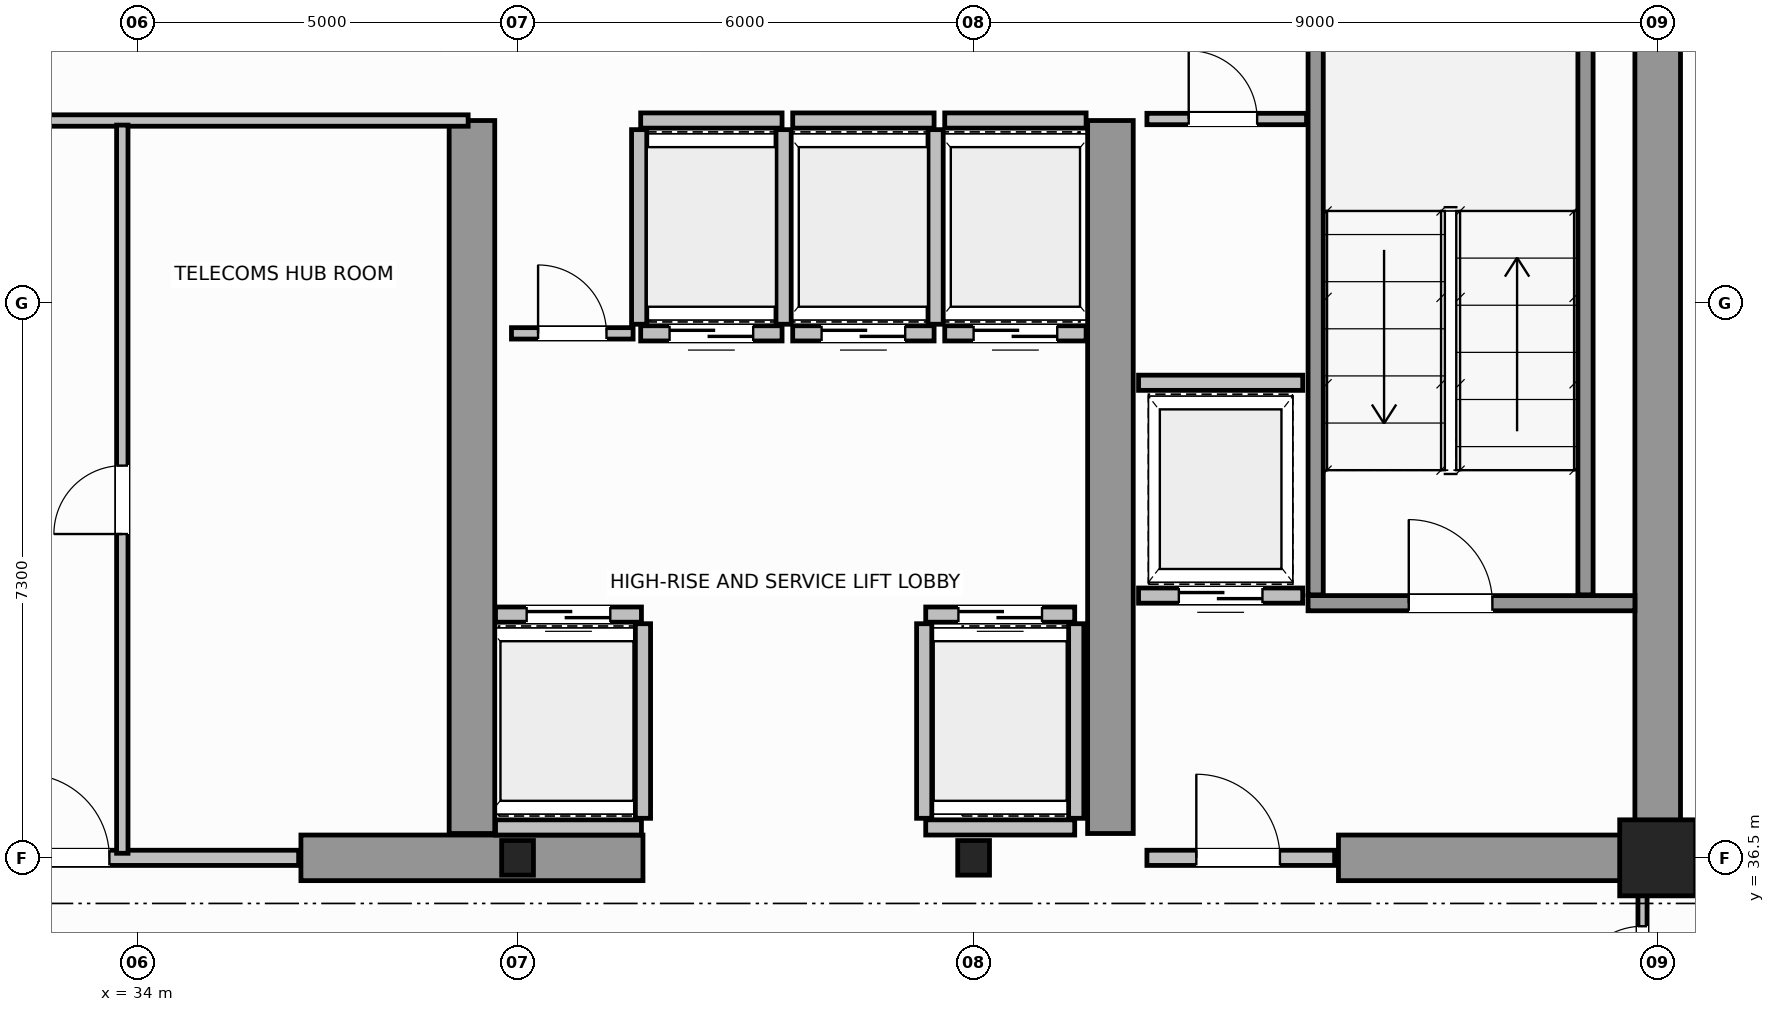
"""IFC4 building model, lengths in metres.
Left out: names, types, materials, properties, quantities, classifications, styles, units other than length and angle.
Written with IfcOpenShell. Run it as: python <this file> out.ifc"""

import sys

from ifc_helpers import new_model, si_unit, direction, frame, frame_2d, origin, origin_2d, place, context, subcontext, project, spatial, rectangle, i_section, extrude, source, transform, mapped, element, fill, save


model = new_model("IFC4")
c1 = context("Model", 3, precision=1e-05, world=origin(), true_north=direction((0.0, 1.0)))
c2 = subcontext(c1, "Body", "Model", "MODEL_VIEW")
j1 = project(units=[si_unit("LENGTHUNIT", "METRE"), si_unit("PLANEANGLEUNIT", "RADIAN")], contexts=[c1])
p1 = place(None, origin())
s1 = spatial("IfcSite", under=j1, at=p1, CompositionType="ELEMENT")
p2 = place(p1, origin())
s2 = spatial("IfcBuilding", under=s1, at=p2, CompositionType="ELEMENT")
p3 = place(p2, frame((0.0, 0.0, 227.0)))
s3 = spatial("IfcBuildingStorey", under=s2, at=p3, CompositionType="ELEMENT", Elevation=227.0)
m1 = source(origin(), c2, "Body", "SweptSolid", [
    extrude(i_section(OverallWidth=0.418, OverallDepth=0.455, WebThickness=0.042, FlangeThickness=0.058, FilletRadius=0.015, at=origin_2d()), origin(), (0.0, 0.0, 1.0), 3.8),
])
for number, where, z_axis, x_axis in (
    (1, (39.0, 36.5, 0.0), (0.0, 0.0, 1.0), (1.0, 0.0, 0.0)),
    (2, (45.0, 36.5, 0.0), (0.0, 0.0, 1.0), (1.0, 0.0, 0.0)),
):
    element("IfcColumn", number, at=place(p3, frame(where, z_axis=z_axis, x_axis=x_axis)), inside=s3, PredefinedType="COLUMN", context=c2, shape_type="MappedRepresentation", body=[
        mapped(m1, transform((0.0, 0.0, 0.0), scale=1.0)),
    ])
m2 = source(origin(), c2, "Body", "SweptSolid", [
    extrude(rectangle(XDim=1.0, YDim=1.0, at=origin_2d()), origin(), (0.0, 0.0, 1.0), 3.8),
])
p4 = place(p3, frame((54.0, 36.5, 0.0), z_axis=(0.0, 0.0, 1.0), x_axis=(1.0, 0.0, 0.0)))
e3 = element("IfcColumn", 3, at=p4, inside=s3, PredefinedType="COLUMN", context=c2, shape_type="MappedRepresentation", body=[
    mapped(m2, transform((0.0, 0.0, 0.0), scale=1.0)),
])
p5 = place(p3, frame((54.0, 36.5, 0.0), z_axis=(0.0, 0.0, 1.0), x_axis=(0.0, 1.0, 0.0)))
e4 = element("IfcWall", 4, at=p5, inside=s3, PredefinedType="SHEAR", context=c2, shape_type="SweptSolid", body=[
    extrude(rectangle(XDim=14.5, YDim=0.6, at=frame_2d((7.25, 0.0))), origin(), (0.0, 0.0, 1.0), 3.8),
])
p6 = place(p3, frame((36.15, 36.5, 0.0), z_axis=(0.0, 0.0, 1.0), x_axis=(1.0, 0.0, 0.0)))
e5 = element("IfcWall", 5, at=p6, inside=s3, PredefinedType="SHEAR", context=c2, shape_type="SweptSolid", body=[
    extrude(rectangle(XDim=4.5, YDim=0.6, at=frame_2d((2.25, 0.0))), origin(), (0.0, 0.0, 1.0), 3.8),
])
p7 = place(p3, frame((49.8, 36.5, 0.0), z_axis=(0.0, 0.0, 1.0), x_axis=(1.0, 0.0, 0.0)))
e6 = element("IfcWall", 6, at=p7, inside=s3, PredefinedType="SHEAR", context=c2, shape_type="SweptSolid", body=[
    extrude(rectangle(XDim=3.88, YDim=0.6, at=frame_2d((1.94, 0.0))), origin(), (0.0, 0.0, 1.0), 2.58),
])
for number, where, z_axis, x_axis in (
    (7, (38.4, 36.82, 0.0), (0.0, 0.0, 1.0), (0.0, 1.0, 0.0)),
    (8, (46.8, 36.82, 0.0), (0.0, 0.0, 1.0), (0.0, 1.0, 0.0)),
):
    element("IfcWall", number, at=place(p3, frame(where, z_axis=z_axis, x_axis=x_axis)), inside=s3, PredefinedType="SHEAR", context=c2, shape_type="SweptSolid", body=[
        extrude(rectangle(XDim=9.38, YDim=0.6, at=frame_2d((4.69, 0.0))), origin(), (0.0, 0.0, 1.0), 3.8),
    ])
p8 = place(p3, frame((49.4, 39.85, 0.0), z_axis=(0.0, 0.0, 1.0), x_axis=(1.0, 0.0, 0.0)))
e9 = element("IfcWall", 9, at=p8, inside=s3, PredefinedType="SOLIDWALL", context=c2, shape_type="SweptSolid", body=[
    extrude(rectangle(XDim=4.3, YDim=0.2, at=frame_2d((2.15, 0.0))), origin(), (0.0, 0.0, 1.0), 3.8),
])
p9 = place(p8, frame((1.325, 0.0, 0.0)))
e10 = element("IfcOpeningElement", 10, at=p9, cuts=e9, PredefinedType="OPENING", context=c2, shape_type="SweptSolid", body=[
    extrude(rectangle(XDim=1.1, YDim=2.15, at=frame_2d((0.55, 1.075))), frame((0.0, 0.11, 0.0), z_axis=(0.0, -1.0, 0.0), x_axis=(1.0, 0.0, 0.0)), (0.0, 0.0, 1.0), 0.22),
])
for number, where, z_axis, x_axis in (
    (11, (49.5, 39.96, 0.0), (0.0, 0.0, 1.0), (0.0, 1.0, 0.0)),
    (12, (53.05, 39.96, 0.0), (0.0, 0.0, 1.0), (0.0, 1.0, 0.0)),
):
    element("IfcWall", number, at=place(p3, frame(where, z_axis=z_axis, x_axis=x_axis)), inside=s3, PredefinedType="SOLIDWALL", context=c2, shape_type="SweptSolid", body=[
        extrude(rectangle(XDim=9.93, YDim=0.2, at=frame_2d((4.965, 0.0))), origin(), (0.0, 0.0, 1.0), 3.8),
    ])
p10 = place(p3, frame((47.28, 36.5, 0.0), z_axis=(0.0, 0.0, 1.0), x_axis=(1.0, 0.0, 0.0)))
e13 = element("IfcWall", 13, at=p10, inside=s3, PredefinedType="SOLIDWALL", context=c2, shape_type="SweptSolid", body=[
    extrude(rectangle(XDim=2.47, YDim=0.2, at=frame_2d((1.235, 0.0))), origin(), (0.0, 0.0, 1.0), 2.57),
])
p11 = place(p10, frame((0.65, 0.0, 0.0)))
e14 = element("IfcOpeningElement", 14, at=p11, cuts=e13, PredefinedType="OPENING", context=c2, shape_type="SweptSolid", body=[
    extrude(rectangle(XDim=1.1, YDim=2.15, at=frame_2d((0.55, 1.075))), frame((0.0, 0.11, 0.0), z_axis=(0.0, -1.0, 0.0), x_axis=(1.0, 0.0, 0.0)), (0.0, 0.0, 1.0), 0.22),
])
p12 = place(p3, frame((38.71, 39.7, 0.0), z_axis=(0.0, 0.0, 1.0), x_axis=(1.0, 0.0, 0.0)))
e15 = element("IfcWall", 15, at=p12, inside=s3, PredefinedType="SOLIDWALL", context=c2, shape_type="SweptSolid", body=[
    extrude(rectangle(XDim=1.92, YDim=0.2, at=frame_2d((0.96, 0.0))), origin(), (0.0, 0.0, 1.0), 3.58),
])
p13 = place(p12, frame((0.41, 0.0, 0.0)))
e16 = element("IfcOpeningElement", 16, at=p13, cuts=e15, PredefinedType="OPENING", context=c2, shape_type="SweptSolid", body=[
    extrude(rectangle(XDim=1.1, YDim=2.15, at=frame_2d((0.55, 1.075))), frame((0.0, 0.11, 0.0), z_axis=(0.0, -1.0, 0.0), x_axis=(1.0, 0.0, 0.0)), (0.0, 0.0, 1.0), 0.22),
])
p14 = place(p3, frame((38.71, 36.9, 0.0), z_axis=(0.0, 0.0, 1.0), x_axis=(1.0, 0.0, 0.0)))
e17 = element("IfcWall", 17, at=p14, inside=s3, PredefinedType="SOLIDWALL", context=c2, shape_type="SweptSolid", body=[
    extrude(rectangle(XDim=1.92, YDim=0.2, at=frame_2d((0.96, 0.0))), origin(), (0.0, 0.0, 1.0), 3.58),
])
p15 = place(p3, frame((40.65, 37.02, 0.0), z_axis=(0.0, 0.0, 1.0), x_axis=(0.0, 1.0, 0.0)))
e18 = element("IfcWall", 18, at=p15, inside=s3, PredefinedType="SOLIDWALL", context=c2, shape_type="SweptSolid", body=[
    extrude(rectangle(XDim=2.56, YDim=0.2, at=frame_2d((1.28, 0.0))), origin(), (0.0, 0.0, 1.0), 3.58),
])
p16 = place(p3, frame((44.37, 39.7, 0.0), z_axis=(0.0, 0.0, 1.0), x_axis=(1.0, 0.0, 0.0)))
e19 = element("IfcWall", 19, at=p16, inside=s3, PredefinedType="SOLIDWALL", context=c2, shape_type="SweptSolid", body=[
    extrude(rectangle(XDim=1.96, YDim=0.2, at=frame_2d((0.98, 0.0))), origin(), (0.0, 0.0, 1.0), 3.58),
])
p17 = place(p16, frame((0.43, 0.0, 0.0)))
e20 = element("IfcOpeningElement", 20, at=p17, cuts=e19, PredefinedType="OPENING", context=c2, shape_type="SweptSolid", body=[
    extrude(rectangle(XDim=1.1, YDim=2.15, at=frame_2d((0.55, 1.075))), frame((0.0, 0.11, 0.0), z_axis=(0.0, -1.0, 0.0), x_axis=(1.0, 0.0, 0.0)), (0.0, 0.0, 1.0), 0.22),
])
p18 = place(p3, frame((44.37, 36.9, 0.0), z_axis=(0.0, 0.0, 1.0), x_axis=(1.0, 0.0, 0.0)))
e21 = element("IfcWall", 21, at=p18, inside=s3, PredefinedType="SOLIDWALL", context=c2, shape_type="SweptSolid", body=[
    extrude(rectangle(XDim=1.96, YDim=0.2, at=frame_2d((0.98, 0.0))), origin(), (0.0, 0.0, 1.0), 2.57),
])
for number, where, z_axis, x_axis in (
    (22, (44.35, 37.02, 0.0), (0.0, 0.0, 1.0), (0.0, 1.0, 0.0)),
    (23, (46.35, 37.02, 0.0), (0.0, 0.0, 1.0), (0.0, 1.0, 0.0)),
):
    element("IfcWall", number, at=place(p3, frame(where, z_axis=z_axis, x_axis=x_axis)), inside=s3, PredefinedType="SOLIDWALL", context=c2, shape_type="SweptSolid", body=[
        extrude(rectangle(XDim=2.56, YDim=0.2, at=frame_2d((1.28, 0.0))), origin(), (0.0, 0.0, 1.0), 3.58),
    ])
p19 = place(p3, frame((40.62, 43.4, 0.0), z_axis=(0.0, 0.0, 1.0), x_axis=(1.0, 0.0, 0.0)))
e24 = element("IfcWall", 24, at=p19, inside=s3, PredefinedType="SOLIDWALL", context=c2, shape_type="SweptSolid", body=[
    extrude(rectangle(XDim=1.86, YDim=0.2, at=frame_2d((0.93, 0.0))), origin(), (0.0, 0.0, 1.0), 3.58),
])
p20 = place(p19, frame((0.38, 0.0, 0.0)))
e25 = element("IfcOpeningElement", 25, at=p20, cuts=e24, PredefinedType="OPENING", context=c2, shape_type="SweptSolid", body=[
    extrude(rectangle(XDim=1.1, YDim=2.15, at=frame_2d((0.55, 1.075))), frame((0.0, 0.11, 0.0), z_axis=(0.0, -1.0, 0.0), x_axis=(1.0, 0.0, 0.0)), (0.0, 0.0, 1.0), 0.22),
])
p21 = place(p3, frame((40.62, 46.2, 0.0), z_axis=(0.0, 0.0, 1.0), x_axis=(1.0, 0.0, 0.0)))
e26 = element("IfcWall", 26, at=p21, inside=s3, PredefinedType="SOLIDWALL", context=c2, shape_type="SweptSolid", body=[
    extrude(rectangle(XDim=1.86, YDim=0.2, at=frame_2d((0.93, 0.0))), origin(), (0.0, 0.0, 1.0), 3.58),
])
for number, where, z_axis, x_axis in (
    (27, (40.6, 43.52, 0.0), (0.0, 0.0, 1.0), (0.0, 1.0, 0.0)),
    (28, (42.5, 43.52, 0.0), (0.0, 0.0, 1.0), (0.0, 1.0, 0.0)),
):
    element("IfcWall", number, at=place(p3, frame(where, z_axis=z_axis, x_axis=x_axis)), inside=s3, PredefinedType="SOLIDWALL", context=c2, shape_type="SweptSolid", body=[
        extrude(rectangle(XDim=2.56, YDim=0.2, at=frame_2d((1.28, 0.0))), origin(), (0.0, 0.0, 1.0), 3.58),
    ])
p22 = place(p3, frame((42.62, 43.4, 0.0), z_axis=(0.0, 0.0, 1.0), x_axis=(1.0, 0.0, 0.0)))
e29 = element("IfcWall", 29, at=p22, inside=s3, PredefinedType="SOLIDWALL", context=c2, shape_type="SweptSolid", body=[
    extrude(rectangle(XDim=1.86, YDim=0.2, at=frame_2d((0.93, 0.0))), origin(), (0.0, 0.0, 1.0), 3.58),
])
p23 = place(p22, frame((0.38, 0.0, 0.0)))
e30 = element("IfcOpeningElement", 30, at=p23, cuts=e29, PredefinedType="OPENING", context=c2, shape_type="SweptSolid", body=[
    extrude(rectangle(XDim=1.1, YDim=2.15, at=frame_2d((0.55, 1.075))), frame((0.0, 0.11, 0.0), z_axis=(0.0, -1.0, 0.0), x_axis=(1.0, 0.0, 0.0)), (0.0, 0.0, 1.0), 0.22),
])
p24 = place(p3, frame((42.62, 46.2, 0.0), z_axis=(0.0, 0.0, 1.0), x_axis=(1.0, 0.0, 0.0)))
e31 = element("IfcWall", 31, at=p24, inside=s3, PredefinedType="SOLIDWALL", context=c2, shape_type="SweptSolid", body=[
    extrude(rectangle(XDim=1.86, YDim=0.2, at=frame_2d((0.93, 0.0))), origin(), (0.0, 0.0, 1.0), 3.58),
])
p25 = place(p3, frame((44.5, 43.52, 0.0), z_axis=(0.0, 0.0, 1.0), x_axis=(0.0, 1.0, 0.0)))
e32 = element("IfcWall", 32, at=p25, inside=s3, PredefinedType="SOLIDWALL", context=c2, shape_type="SweptSolid", body=[
    extrude(rectangle(XDim=2.56, YDim=0.2, at=frame_2d((1.28, 0.0))), origin(), (0.0, 0.0, 1.0), 3.58),
])
p26 = place(p3, frame((44.62, 43.4, 0.0), z_axis=(0.0, 0.0, 1.0), x_axis=(1.0, 0.0, 0.0)))
e33 = element("IfcWall", 33, at=p26, inside=s3, PredefinedType="SOLIDWALL", context=c2, shape_type="SweptSolid", body=[
    extrude(rectangle(XDim=1.86, YDim=0.2, at=frame_2d((0.93, 0.0))), origin(), (0.0, 0.0, 1.0), 3.58),
])
p27 = place(p26, frame((0.38, 0.0, 0.0)))
e34 = element("IfcOpeningElement", 34, at=p27, cuts=e33, PredefinedType="OPENING", context=c2, shape_type="SweptSolid", body=[
    extrude(rectangle(XDim=1.1, YDim=2.15, at=frame_2d((0.55, 1.075))), frame((0.0, 0.11, 0.0), z_axis=(0.0, -1.0, 0.0), x_axis=(1.0, 0.0, 0.0)), (0.0, 0.0, 1.0), 0.22),
])
p28 = place(p3, frame((44.62, 46.2, 0.0), z_axis=(0.0, 0.0, 1.0), x_axis=(1.0, 0.0, 0.0)))
e35 = element("IfcWall", 35, at=p28, inside=s3, PredefinedType="SOLIDWALL", context=c2, shape_type="SweptSolid", body=[
    extrude(rectangle(XDim=1.86, YDim=0.2, at=frame_2d((0.93, 0.0))), origin(), (0.0, 0.0, 1.0), 3.58),
])
p29 = place(p3, frame((47.17, 39.95, 0.0), z_axis=(0.0, 0.0, 1.0), x_axis=(1.0, 0.0, 0.0)))
e36 = element("IfcWall", 36, at=p29, inside=s3, PredefinedType="SOLIDWALL", context=c2, shape_type="SweptSolid", body=[
    extrude(rectangle(XDim=2.16, YDim=0.2, at=frame_2d((1.08, 0.0))), origin(), (0.0, 0.0, 1.0), 3.58),
])
p30 = place(p29, frame((0.53, 0.0, 0.0)))
e37 = element("IfcOpeningElement", 37, at=p30, cuts=e36, PredefinedType="OPENING", context=c2, shape_type="SweptSolid", body=[
    extrude(rectangle(XDim=1.1, YDim=2.15, at=frame_2d((0.55, 1.075))), frame((0.0, 0.11, 0.0), z_axis=(0.0, -1.0, 0.0), x_axis=(1.0, 0.0, 0.0)), (0.0, 0.0, 1.0), 0.22),
])
p31 = place(p3, frame((47.17, 42.75, 0.0), z_axis=(0.0, 0.0, 1.0), x_axis=(1.0, 0.0, 0.0)))
e38 = element("IfcWall", 38, at=p31, inside=s3, PredefinedType="SOLIDWALL", context=c2, shape_type="SweptSolid", body=[
    extrude(rectangle(XDim=2.16, YDim=0.2, at=frame_2d((1.08, 0.0))), origin(), (0.0, 0.0, 1.0), 3.58),
])
p32 = place(p3, frame((32.08, 36.5, 0.0), z_axis=(0.0, 0.0, 1.0), x_axis=(1.0, 0.0, 0.0)))
e39 = element("IfcWall", 39, at=p32, inside=s3, PredefinedType="SOLIDWALL", context=c2, shape_type="SweptSolid", body=[
    extrude(rectangle(XDim=4.04, YDim=0.2, at=frame_2d((2.02, 0.0))), origin(), (0.0, 0.0, 1.0), 3.02),
])
p33 = place(p32, frame((0.45, 0.0, 0.0)))
e40 = element("IfcOpeningElement", 40, at=p33, cuts=e39, PredefinedType="OPENING", context=c2, shape_type="SweptSolid", body=[
    extrude(rectangle(XDim=1.1, YDim=2.15, at=frame_2d((0.55, 1.075))), frame((0.0, 0.11, 0.0), z_axis=(0.0, -1.0, 0.0), x_axis=(1.0, 0.0, 0.0)), (0.0, 0.0, 1.0), 0.22),
])
p34 = place(p3, frame((29.85, 46.2, 0.0), z_axis=(0.0, 0.0, 1.0), x_axis=(1.0, 0.0, 0.0)))
e41 = element("IfcWall", 41, at=p34, inside=s3, PredefinedType="PARTITIONING", context=c2, shape_type="SweptSolid", body=[
    extrude(rectangle(XDim=8.5, YDim=0.15, at=frame_2d((4.25, 0.0))), origin(), (0.0, 0.0, 1.0), 3.58),
])
p35 = place(p3, frame((33.8, 36.56, 0.0), z_axis=(0.0, 0.0, 1.0), x_axis=(0.0, 1.0, 0.0)))
e42 = element("IfcWall", 42, at=p35, inside=s3, PredefinedType="PARTITIONING", context=c2, shape_type="SweptSolid", body=[
    extrude(rectangle(XDim=9.58, YDim=0.15, at=frame_2d((4.79, 0.0))), origin(), (0.0, 0.0, 1.0), 3.58),
])
p36 = place(p35, frame((4.2, 0.0, 0.0)))
e43 = element("IfcOpeningElement", 43, at=p36, cuts=e42, PredefinedType="OPENING", context=c2, shape_type="SweptSolid", body=[
    extrude(rectangle(XDim=0.9, YDim=2.1, at=frame_2d((0.45, 1.05))), frame((0.0, 0.085, 0.0), z_axis=(0.0, -1.0, 0.0), x_axis=(1.0, 0.0, 0.0)), (0.0, 0.0, 1.0), 0.17),
])
p37 = place(p3, frame((47.28, 46.22, 0.0), z_axis=(0.0, 0.0, 1.0), x_axis=(1.0, 0.0, 0.0)))
e44 = element("IfcWall", 44, at=p37, inside=s3, PredefinedType="PARTITIONING", context=c2, shape_type="SweptSolid", body=[
    extrude(rectangle(XDim=2.1, YDim=0.15, at=frame_2d((1.05, 0.0))), origin(), (0.0, 0.0, 1.0), 3.58),
])
p38 = place(p37, frame((0.55, 0.0, 0.0)))
e45 = element("IfcOpeningElement", 45, at=p38, cuts=e44, PredefinedType="OPENING", context=c2, shape_type="SweptSolid", body=[
    extrude(rectangle(XDim=0.9, YDim=2.1, at=frame_2d((0.45, 1.05))), frame((0.0, 0.085, 0.0), z_axis=(0.0, -1.0, 0.0), x_axis=(1.0, 0.0, 0.0)), (0.0, 0.0, 1.0), 0.17),
])
p39 = place(p3, frame((38.92, 43.4, 0.0), z_axis=(0.0, 0.0, 1.0), x_axis=(1.0, 0.0, 0.0)))
e46 = element("IfcWall", 46, at=p39, inside=s3, PredefinedType="PARTITIONING", context=c2, shape_type="SweptSolid", body=[
    extrude(rectangle(XDim=1.6, YDim=0.15, at=frame_2d((0.8, 0.0))), origin(), (0.0, 0.0, 1.0), 3.58),
])
p40 = place(p39, frame((0.35, 0.0, 0.0)))
e47 = element("IfcOpeningElement", 47, at=p40, cuts=e46, PredefinedType="OPENING", context=c2, shape_type="SweptSolid", body=[
    extrude(rectangle(XDim=0.9, YDim=2.1, at=frame_2d((0.45, 1.05))), frame((0.0, 0.085, 0.0), z_axis=(0.0, -1.0, 0.0), x_axis=(1.0, 0.0, 0.0)), (0.0, 0.0, 1.0), 0.17),
])
p41 = place(p3, frame((53.8, 34.0, 0.0), z_axis=(0.0, 0.0, 1.0), x_axis=(0.0, 1.0, 0.0)))
e48 = element("IfcWall", 48, at=p41, inside=s3, PredefinedType="PARTITIONING", context=c2, shape_type="SweptSolid", body=[
    extrude(rectangle(XDim=2.44, YDim=0.12, at=frame_2d((1.22, 0.0))), origin(), (0.0, 0.0, 1.0), 3.58),
])
p42 = place(p41, frame((0.7, 0.0, 0.0)))
e49 = element("IfcOpeningElement", 49, at=p42, cuts=e48, PredefinedType="OPENING", context=c2, shape_type="SweptSolid", body=[
    extrude(rectangle(XDim=0.9, YDim=2.15, at=frame_2d((0.45, 1.075))), frame((0.0, 0.07, 0.0), z_axis=(0.0, -1.0, 0.0), x_axis=(1.0, 0.0, 0.0)), (0.0, 0.0, 1.0), 0.14),
])
m3 = source(origin(), c2, "Body", "SweptSolid", [
    extrude(rectangle(XDim=1.1, YDim=2.15, at=frame_2d((0.55, 1.075))), frame((0.0, 0.025, 0.0), z_axis=(0.0, -1.0, 0.0), x_axis=(1.0, 0.0, 0.0)), (0.0, 0.0, 1.0), 0.05),
])
p43 = place(p9, origin())
e50 = element("IfcDoor", 50, at=p43, inside=s3, OperationType="SINGLE_SWING_RIGHT", PredefinedType="DOOR", context=c2, shape_type="MappedRepresentation", body=[
    mapped(m3, transform((0.0, 0.0, 0.0), scale=1.0)),
])
fill(e10, e50)
p44 = place(p11, origin())
e51 = element("IfcDoor", 51, at=p44, inside=s3, OperationType="SINGLE_SWING_LEFT", PredefinedType="DOOR", context=c2, shape_type="MappedRepresentation", body=[
    mapped(m3, transform((0.0, 0.0, 0.0), scale=1.0)),
])
fill(e14, e51)
p45 = place(p13, origin())
e52 = element("IfcDoor", 52, at=p45, inside=s3, OperationType="DOUBLE_DOOR_SLIDING", PredefinedType="DOOR", context=c2, shape_type="MappedRepresentation", body=[
    mapped(m3, transform((0.0, 0.0, 0.0), scale=1.0)),
])
fill(e16, e52)
p46 = place(p17, origin())
e53 = element("IfcDoor", 53, at=p46, inside=s3, OperationType="DOUBLE_DOOR_SLIDING", PredefinedType="DOOR", context=c2, shape_type="MappedRepresentation", body=[
    mapped(m3, transform((0.0, 0.0, 0.0), scale=1.0)),
])
fill(e20, e53)
p47 = place(p20, origin())
e54 = element("IfcDoor", 54, at=p47, inside=s3, OperationType="DOUBLE_DOOR_SLIDING", PredefinedType="DOOR", context=c2, shape_type="MappedRepresentation", body=[
    mapped(m3, transform((0.0, 0.0, 0.0), scale=1.0)),
])
fill(e25, e54)
p48 = place(p23, origin())
e55 = element("IfcDoor", 55, at=p48, inside=s3, OperationType="DOUBLE_DOOR_SLIDING", PredefinedType="DOOR", context=c2, shape_type="MappedRepresentation", body=[
    mapped(m3, transform((0.0, 0.0, 0.0), scale=1.0)),
])
fill(e30, e55)
p49 = place(p27, origin())
e56 = element("IfcDoor", 56, at=p49, inside=s3, OperationType="DOUBLE_DOOR_SLIDING", PredefinedType="DOOR", context=c2, shape_type="MappedRepresentation", body=[
    mapped(m3, transform((0.0, 0.0, 0.0), scale=1.0)),
])
fill(e34, e56)
p50 = place(p30, origin())
e57 = element("IfcDoor", 57, at=p50, inside=s3, OperationType="DOUBLE_DOOR_SLIDING", PredefinedType="DOOR", context=c2, shape_type="MappedRepresentation", body=[
    mapped(m3, transform((0.0, 0.0, 0.0), scale=1.0)),
])
fill(e37, e57)
p51 = place(p33, origin())
e58 = element("IfcDoor", 58, at=p51, inside=s3, OperationType="SINGLE_SWING_LEFT", PredefinedType="DOOR", context=c2, shape_type="MappedRepresentation", body=[
    mapped(m3, transform((0.0, 0.0, 0.0), scale=1.0)),
])
fill(e40, e58)
m4 = source(origin(), c2, "Body", "SweptSolid", [
    extrude(rectangle(XDim=0.9, YDim=2.1, at=frame_2d((0.45, 1.05))), frame((0.0, 0.025, 0.0), z_axis=(0.0, -1.0, 0.0), x_axis=(1.0, 0.0, 0.0)), (0.0, 0.0, 1.0), 0.05),
])
p52 = place(p36, origin())
e59 = element("IfcDoor", 59, at=p52, inside=s3, OperationType="SINGLE_SWING_RIGHT", PredefinedType="DOOR", context=c2, shape_type="MappedRepresentation", body=[
    mapped(m4, transform((0.0, 0.0, 0.0), scale=1.0)),
])
fill(e43, e59)
p53 = place(p38, origin())
e60 = element("IfcDoor", 60, at=p53, inside=s3, OperationType="SINGLE_SWING_RIGHT", PredefinedType="DOOR", context=c2, shape_type="MappedRepresentation", body=[
    mapped(m4, transform((0.0, 0.0, 0.0), scale=1.0)),
])
fill(e45, e60)
p54 = place(p40, origin())
e61 = element("IfcDoor", 61, at=p54, inside=s3, OperationType="SINGLE_SWING_LEFT", PredefinedType="DOOR", context=c2, shape_type="MappedRepresentation", body=[
    mapped(m4, transform((0.0, 0.0, 0.0), scale=1.0)),
])
fill(e47, e61)
m5 = source(origin(), c2, "Body", "SweptSolid", [
    extrude(rectangle(XDim=0.9, YDim=2.15, at=frame_2d((0.45, 1.075))), frame((0.0, 0.025, 0.0), z_axis=(0.0, -1.0, 0.0), x_axis=(1.0, 0.0, 0.0)), (0.0, 0.0, 1.0), 0.05),
])
p55 = place(p42, origin())
e62 = element("IfcDoor", 62, at=p55, inside=s3, OperationType="SINGLE_SWING_RIGHT", PredefinedType="DOOR", context=c2, shape_type="MappedRepresentation", body=[
    mapped(m5, transform((0.0, 0.0, 0.0), scale=1.0)),
])
fill(e49, e62)
save(model, sys.argv[1])
